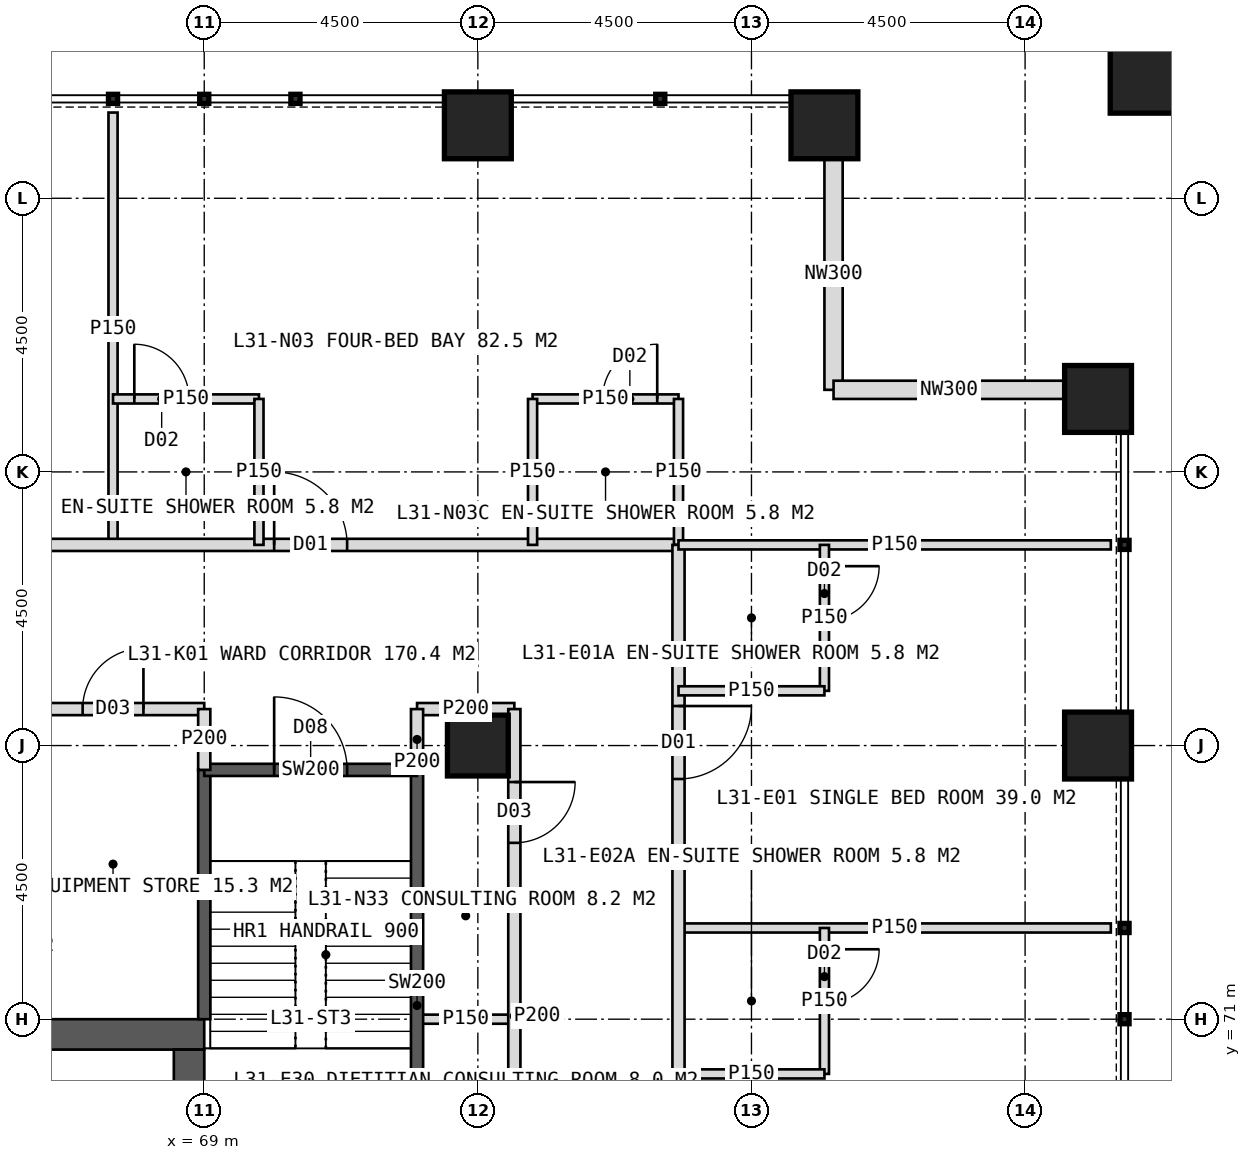
"""IFC4 building model, lengths in metres.
Left out: names, types, materials, properties, quantities, classifications, styles, units other than length and angle.
Written with IfcOpenShell. Run it as: python <this file> out.ifc"""

import sys

from ifc_helpers import new_model, si_unit, direction, frame, frame_2d, origin, origin_2d, place, context, subcontext, project, spatial, rectangle, hollow_rectangle, extrude, element, fill, save


model = new_model("IFC4")
c1 = context("Model", 3, precision=1e-05, world=origin(), true_north=direction((0.0, 1.0)))
c2 = subcontext(c1, "Body", "Model", "MODEL_VIEW")
j1 = project(units=[si_unit("LENGTHUNIT", "METRE"), si_unit("PLANEANGLEUNIT", "RADIAN")], contexts=[c1])
p1 = place(None, origin())
s1 = spatial("IfcSite", under=j1, at=p1, CompositionType="ELEMENT")
p2 = place(p1, origin())
s2 = spatial("IfcBuilding", under=s1, at=p2, CompositionType="ELEMENT")
p3 = place(p2, frame((0.0, 0.0, 132.0)))
s3 = spatial("IfcBuildingStorey", under=s2, at=p3, CompositionType="ELEMENT", Elevation=132.0)
p4 = place(p3, frame((51.0, 70.75, 0.0), z_axis=(0.0, 0.0, 1.0), x_axis=(1.0, 0.0, 0.0)))
e1 = element("IfcWall", 1, at=p4, inside=s3, PredefinedType="SHEAR", context=c2, shape_type="SweptSolid", body=[
    extrude(rectangle(XDim=18.0, YDim=0.5, at=frame_2d((9.0, 0.0))), origin(), (0.0, 0.0, 1.0), 4.0),
])
p5 = place(p4, frame((8.1, 0.0, 0.0)))
e2 = element("IfcOpeningElement", 2, at=p5, cuts=e1, PredefinedType="OPENING", context=c2, shape_type="SweptSolid", body=[
    extrude(rectangle(XDim=1.8, YDim=2.2, at=frame_2d((0.9, 1.1))), frame((0.0, 0.26, 0.0), z_axis=(0.0, -1.0, 0.0), x_axis=(1.0, 0.0, 0.0)), (0.0, 0.0, 1.0), 0.52),
])
p6 = place(p3, frame((68.75, 53.5, 0.0), z_axis=(0.0, 0.0, 1.0), x_axis=(0.0, 1.0, 0.0)))
e3 = element("IfcWall", 3, at=p6, inside=s3, PredefinedType="SHEAR", context=c2, shape_type="SweptSolid", body=[
    extrude(rectangle(XDim=17.0, YDim=0.5, at=frame_2d((8.5, 0.0))), origin(), (0.0, 0.0, 1.0), 4.0),
])
p7 = place(p6, frame((9.5, 0.0, 0.0)))
e4 = element("IfcOpeningElement", 4, at=p7, cuts=e3, PredefinedType="OPENING", context=c2, shape_type="SweptSolid", body=[
    extrude(rectangle(XDim=1.5, YDim=2.2, at=frame_2d((0.75, 1.1))), frame((0.0, 0.26, 0.0), z_axis=(0.0, -1.0, 0.0), x_axis=(1.0, 0.0, 0.0)), (0.0, 0.0, 1.0), 0.52),
])
p8 = place(p3, frame((73.5, 75.5, 0.0), z_axis=(0.0, 0.0, 1.0), x_axis=(1.0, 0.0, 0.0)))
e5 = element("IfcColumn", 5, at=p8, inside=s3, PredefinedType="COLUMN", context=c2, shape_type="SweptSolid", body=[
    extrude(hollow_rectangle(XDim=1.0, YDim=1.0, WallThickness=0.1, at=origin_2d()), origin(), (0.0, 0.0, 1.0), 4.0),
])
for number, where, z_axis, x_axis in (
    (6, (73.5, 85.7, 0.0), (0.0, 0.0, 1.0), (1.0, 0.0, 0.0)),
    (7, (83.7, 75.5, 0.0), (0.0, 0.0, 1.0), (1.0, 0.0, 0.0)),
    (8, (79.2, 85.7, 0.0), (0.0, 0.0, 1.0), (1.0, 0.0, 0.0)),
    (9, (83.7, 81.2, 0.0), (0.0, 0.0, 1.0), (1.0, 0.0, 0.0)),
):
    element("IfcColumn", number, at=place(p3, frame(where, z_axis=z_axis, x_axis=x_axis)), inside=s3, PredefinedType="COLUMN", context=c2, shape_type="SweptSolid", body=[
        extrude(hollow_rectangle(XDim=1.1, YDim=1.1, WallThickness=0.1, at=origin_2d()), origin(), (0.0, 0.0, 1.0), 4.0),
    ])
p9 = place(p3, frame((84.6, 86.6, 0.0), z_axis=(0.0, 0.0, 1.0), x_axis=(1.0, 0.0, 0.0)))
e10 = element("IfcColumn", 10, at=p9, inside=s3, PredefinedType="COLUMN", context=c2, shape_type="SweptSolid", body=[
    extrude(hollow_rectangle(XDim=1.4, YDim=1.4, WallThickness=0.08, at=origin_2d()), origin(), (0.0, 0.0, 1.0), 4.0),
])
for number, where, z_axis, x_axis in (
    (11, (79.35, 85.15, 0.0), (0.0, 0.0, 1.0), (0.0, -1.0, 0.0)),
    (12, (79.35, 81.35, 0.0), (0.0, 0.0, 1.0), (1.0, 0.0, 0.0)),
):
    element("IfcWall", number, at=place(p3, frame(where, z_axis=z_axis, x_axis=x_axis)), inside=s3, PredefinedType="ELEMENTEDWALL", context=c2, shape_type="SweptSolid", body=[
        extrude(rectangle(XDim=3.8, YDim=0.3, at=frame_2d((1.9, 0.0))), origin(), (0.0, 0.0, 1.0), 4.0),
    ])
p10 = place(p3, frame((67.5, 78.8, 0.0), z_axis=(0.0, 0.0, 1.0), x_axis=(0.0, 1.0, 0.0)))
e13 = element("IfcWall", 13, at=p10, inside=s3, PredefinedType="PARTITIONING", context=c2, shape_type="SweptSolid", body=[
    extrude(rectangle(XDim=7.11, YDim=0.15, at=frame_2d((3.555, 0.0))), origin(), (0.0, 0.0, 1.0), 3.75),
])
p11 = place(p3, frame((43.2, 78.8, 0.0), z_axis=(0.0, 0.0, 1.0), x_axis=(1.0, 0.0, 0.0)))
e14 = element("IfcWall", 14, at=p11, inside=s3, PredefinedType="PARTITIONING", context=c2, shape_type="SweptSolid", body=[
    extrude(rectangle(XDim=33.6, YDim=0.2, at=frame_2d((16.8, 0.0))), origin(), (0.0, 0.0, 1.0), 3.75),
])
p12 = place(p11, frame((3.25, 0.0, 0.0)))
e15 = element("IfcOpeningElement", 15, at=p12, cuts=e14, PredefinedType="OPENING", context=c2, shape_type="SweptSolid", body=[
    extrude(rectangle(XDim=1.2, YDim=2.2, at=frame_2d((0.6, 1.1))), frame((0.0, 0.11, 0.0), z_axis=(0.0, -1.0, 0.0), x_axis=(1.0, 0.0, 0.0)), (0.0, 0.0, 1.0), 0.22),
])
p13 = place(p11, frame((12.55, 0.0, 0.0)))
e16 = element("IfcOpeningElement", 16, at=p13, cuts=e14, PredefinedType="OPENING", context=c2, shape_type="SweptSolid", body=[
    extrude(rectangle(XDim=1.2, YDim=2.2, at=frame_2d((0.6, 1.1))), frame((0.0, 0.11, 0.0), z_axis=(0.0, -1.0, 0.0), x_axis=(1.0, 0.0, 0.0)), (0.0, 0.0, 1.0), 0.22),
])
p14 = place(p11, frame((26.95, 0.0, 0.0)))
e17 = element("IfcOpeningElement", 17, at=p14, cuts=e14, PredefinedType="OPENING", context=c2, shape_type="SweptSolid", body=[
    extrude(rectangle(XDim=1.2, YDim=2.2, at=frame_2d((0.6, 1.1))), frame((0.0, 0.11, 0.0), z_axis=(0.0, -1.0, 0.0), x_axis=(1.0, 0.0, 0.0)), (0.0, 0.0, 1.0), 0.22),
])
p15 = place(p3, frame((67.5, 81.2, 0.0), z_axis=(0.0, 0.0, 1.0), x_axis=(1.0, 0.0, 0.0)))
e18 = element("IfcWall", 18, at=p15, inside=s3, PredefinedType="PARTITIONING", context=c2, shape_type="SweptSolid", body=[
    extrude(rectangle(XDim=2.4, YDim=0.15, at=frame_2d((1.2, 0.0))), origin(), (0.0, 0.0, 1.0), 3.75),
])
p16 = place(p15, frame((0.35, 0.0, 0.0)))
e19 = element("IfcOpeningElement", 19, at=p16, cuts=e18, PredefinedType="OPENING", context=c2, shape_type="SweptSolid", body=[
    extrude(rectangle(XDim=0.9, YDim=2.1, at=frame_2d((0.45, 1.05))), frame((0.0, 0.085, 0.0), z_axis=(0.0, -1.0, 0.0), x_axis=(1.0, 0.0, 0.0)), (0.0, 0.0, 1.0), 0.17),
])
p17 = place(p3, frame((69.9, 78.8, 0.0), z_axis=(0.0, 0.0, 1.0), x_axis=(0.0, 1.0, 0.0)))
e20 = element("IfcWall", 20, at=p17, inside=s3, PredefinedType="PARTITIONING", context=c2, shape_type="SweptSolid", body=[
    extrude(rectangle(XDim=2.4, YDim=0.15, at=frame_2d((1.2, 0.0))), origin(), (0.0, 0.0, 1.0), 3.75),
])
p18 = place(p3, frame((74.4, 81.2, 0.0), z_axis=(0.0, 0.0, 1.0), x_axis=(1.0, 0.0, 0.0)))
e21 = element("IfcWall", 21, at=p18, inside=s3, PredefinedType="PARTITIONING", context=c2, shape_type="SweptSolid", body=[
    extrude(rectangle(XDim=2.4, YDim=0.15, at=frame_2d((1.2, 0.0))), origin(), (0.0, 0.0, 1.0), 2.997),
])
p19 = place(p18, frame((1.15, 0.0, 0.0)))
e22 = element("IfcOpeningElement", 22, at=p19, cuts=e21, PredefinedType="OPENING", context=c2, shape_type="SweptSolid", body=[
    extrude(rectangle(XDim=0.9, YDim=2.1, at=frame_2d((0.45, 1.05))), frame((0.0, 0.085, 0.0), z_axis=(0.0, -1.0, 0.0), x_axis=(1.0, 0.0, 0.0)), (0.0, 0.0, 1.0), 0.17),
])
for number, where, z_axis, x_axis in (
    (23, (74.4, 78.8, 0.0), (0.0, 0.0, 1.0), (0.0, 1.0, 0.0)),
    (24, (76.8, 78.8, 0.0), (0.0, 0.0, 1.0), (0.0, 1.0, 0.0)),
):
    element("IfcWall", number, at=place(p3, frame(where, z_axis=z_axis, x_axis=x_axis)), inside=s3, PredefinedType="PARTITIONING", context=c2, shape_type="SweptSolid", body=[
        extrude(rectangle(XDim=2.4, YDim=0.15, at=frame_2d((1.2, 0.0))), origin(), (0.0, 0.0, 1.0), 3.75),
    ])
p20 = place(p3, frame((62.25, 76.1, 0.0), z_axis=(0.0, 0.0, 1.0), x_axis=(1.0, 0.0, 0.0)))
e25 = element("IfcWall", 25, at=p20, inside=s3, PredefinedType="PARTITIONING", context=c2, shape_type="SweptSolid", body=[
    extrude(rectangle(XDim=6.75, YDim=0.2, at=frame_2d((3.375, 0.0))), origin(), (0.0, 0.0, 1.0), 3.75),
])
p21 = place(p20, frame((0.325, 0.0, 0.0)))
e26 = element("IfcOpeningElement", 26, at=p21, cuts=e25, PredefinedType="OPENING", context=c2, shape_type="SweptSolid", body=[
    extrude(rectangle(XDim=1.0, YDim=2.1, at=frame_2d((0.5, 1.05))), frame((0.0, 0.11, 0.0), z_axis=(0.0, -1.0, 0.0), x_axis=(1.0, 0.0, 0.0)), (0.0, 0.0, 1.0), 0.22),
])
p22 = place(p20, frame((4.75, 0.0, 0.0)))
e27 = element("IfcOpeningElement", 27, at=p22, cuts=e25, PredefinedType="OPENING", context=c2, shape_type="SweptSolid", body=[
    extrude(rectangle(XDim=1.0, YDim=2.1, at=frame_2d((0.5, 1.05))), frame((0.0, 0.11, 0.0), z_axis=(0.0, -1.0, 0.0), x_axis=(1.0, 0.0, 0.0)), (0.0, 0.0, 1.0), 0.22),
])
p23 = place(p3, frame((72.5, 76.1, 0.0), z_axis=(0.0, 0.0, 1.0), x_axis=(1.0, 0.0, 0.0)))
e28 = element("IfcWall", 28, at=p23, inside=s3, PredefinedType="PARTITIONING", context=c2, shape_type="SweptSolid", body=[
    extrude(rectangle(XDim=1.6, YDim=0.2, at=frame_2d((0.8, 0.0))), origin(), (0.0, 0.0, 1.0), 3.75),
])
p24 = place(p3, frame((76.8, 72.5, 0.0), z_axis=(0.0, 0.0, 1.0), x_axis=(1.0, 0.0, 0.0)))
e29 = element("IfcWall", 29, at=p24, inside=s3, PredefinedType="PARTITIONING", context=c2, shape_type="SweptSolid", body=[
    extrude(rectangle(XDim=7.11, YDim=0.15, at=frame_2d((3.555, 0.0))), origin(), (0.0, 0.0, 1.0), 3.75),
])
p25 = place(p3, frame((76.8, 78.8, 0.0), z_axis=(0.0, 0.0, 1.0), x_axis=(0.0, -1.0, 0.0)))
e30 = element("IfcWall", 30, at=p25, inside=s3, PredefinedType="PARTITIONING", context=c2, shape_type="SweptSolid", body=[
    extrude(rectangle(XDim=33.6, YDim=0.2, at=frame_2d((16.8, 0.0))), origin(), (0.0, 0.0, 1.0), 3.75),
])
p26 = place(p25, frame((2.65, 0.0, 0.0)))
e31 = element("IfcOpeningElement", 31, at=p26, cuts=e30, PredefinedType="OPENING", context=c2, shape_type="SweptSolid", body=[
    extrude(rectangle(XDim=1.2, YDim=2.2, at=frame_2d((0.6, 1.1))), frame((0.0, 0.11, 0.0), z_axis=(0.0, -1.0, 0.0), x_axis=(1.0, 0.0, 0.0)), (0.0, 0.0, 1.0), 0.22),
])
p27 = place(p25, frame((8.95, 0.0, 0.0)))
e32 = element("IfcOpeningElement", 32, at=p27, cuts=e30, PredefinedType="OPENING", context=c2, shape_type="SweptSolid", body=[
    extrude(rectangle(XDim=1.2, YDim=2.2, at=frame_2d((0.6, 1.1))), frame((0.0, 0.11, 0.0), z_axis=(0.0, -1.0, 0.0), x_axis=(1.0, 0.0, 0.0)), (0.0, 0.0, 1.0), 0.22),
])
p28 = place(p25, frame((19.45, 0.0, 0.0)))
e33 = element("IfcOpeningElement", 33, at=p28, cuts=e30, PredefinedType="OPENING", context=c2, shape_type="SweptSolid", body=[
    extrude(rectangle(XDim=1.2, YDim=2.2, at=frame_2d((0.6, 1.1))), frame((0.0, 0.11, 0.0), z_axis=(0.0, -1.0, 0.0), x_axis=(1.0, 0.0, 0.0)), (0.0, 0.0, 1.0), 0.22),
])
p29 = place(p25, frame((28.45, 0.0, 0.0)))
e34 = element("IfcOpeningElement", 34, at=p29, cuts=e30, PredefinedType="OPENING", context=c2, shape_type="SweptSolid", body=[
    extrude(rectangle(XDim=1.2, YDim=2.2, at=frame_2d((0.6, 1.1))), frame((0.0, 0.11, 0.0), z_axis=(0.0, -1.0, 0.0), x_axis=(1.0, 0.0, 0.0)), (0.0, 0.0, 1.0), 0.22),
])
p30 = place(p3, frame((76.8, 78.8, 0.0), z_axis=(0.0, 0.0, 1.0), x_axis=(1.0, 0.0, 0.0)))
e35 = element("IfcWall", 35, at=p30, inside=s3, PredefinedType="PARTITIONING", context=c2, shape_type="SweptSolid", body=[
    extrude(rectangle(XDim=7.11, YDim=0.15, at=frame_2d((3.555, 0.0))), origin(), (0.0, 0.0, 1.0), 3.75),
])
p31 = place(p3, frame((79.2, 78.8, 0.0), z_axis=(0.0, 0.0, 1.0), x_axis=(0.0, -1.0, 0.0)))
e36 = element("IfcWall", 36, at=p31, inside=s3, PredefinedType="PARTITIONING", context=c2, shape_type="SweptSolid", body=[
    extrude(rectangle(XDim=2.4, YDim=0.15, at=frame_2d((1.2, 0.0))), origin(), (0.0, 0.0, 1.0), 2.997),
])
p32 = place(p31, frame((0.35, 0.0, 0.0)))
e37 = element("IfcOpeningElement", 37, at=p32, cuts=e36, PredefinedType="OPENING", context=c2, shape_type="SweptSolid", body=[
    extrude(rectangle(XDim=0.9, YDim=2.1, at=frame_2d((0.45, 1.05))), frame((0.0, 0.085, 0.0), z_axis=(0.0, -1.0, 0.0), x_axis=(1.0, 0.0, 0.0)), (0.0, 0.0, 1.0), 0.17),
])
p33 = place(p3, frame((76.8, 76.4, 0.0), z_axis=(0.0, 0.0, 1.0), x_axis=(1.0, 0.0, 0.0)))
e38 = element("IfcWall", 38, at=p33, inside=s3, PredefinedType="PARTITIONING", context=c2, shape_type="SweptSolid", body=[
    extrude(rectangle(XDim=2.4, YDim=0.15, at=frame_2d((1.2, 0.0))), origin(), (0.0, 0.0, 1.0), 3.75),
])
p34 = place(p3, frame((79.2, 72.5, 0.0), z_axis=(0.0, 0.0, 1.0), x_axis=(0.0, -1.0, 0.0)))
e39 = element("IfcWall", 39, at=p34, inside=s3, PredefinedType="PARTITIONING", context=c2, shape_type="SweptSolid", body=[
    extrude(rectangle(XDim=2.4, YDim=0.15, at=frame_2d((1.2, 0.0))), origin(), (0.0, 0.0, 1.0), 3.75),
])
p35 = place(p34, frame((0.35, 0.0, 0.0)))
e40 = element("IfcOpeningElement", 40, at=p35, cuts=e39, PredefinedType="OPENING", context=c2, shape_type="SweptSolid", body=[
    extrude(rectangle(XDim=0.9, YDim=2.1, at=frame_2d((0.45, 1.05))), frame((0.0, 0.085, 0.0), z_axis=(0.0, -1.0, 0.0), x_axis=(1.0, 0.0, 0.0)), (0.0, 0.0, 1.0), 0.17),
])
p36 = place(p3, frame((76.8, 70.1, 0.0), z_axis=(0.0, 0.0, 1.0), x_axis=(1.0, 0.0, 0.0)))
e41 = element("IfcWall", 41, at=p36, inside=s3, PredefinedType="PARTITIONING", context=c2, shape_type="SweptSolid", body=[
    extrude(rectangle(XDim=2.4, YDim=0.15, at=frame_2d((1.2, 0.0))), origin(), (0.0, 0.0, 1.0), 3.75),
])
p37 = place(p3, frame((72.5, 71.0, 0.0), z_axis=(0.0, 0.0, 1.0), x_axis=(1.0, 0.0, 0.0)))
e42 = element("IfcWall", 42, at=p37, inside=s3, PredefinedType="PARTITIONING", context=c2, shape_type="SweptSolid", body=[
    extrude(rectangle(XDim=1.6, YDim=0.15, at=frame_2d((0.8, 0.0))), origin(), (0.0, 0.0, 1.0), 3.75),
])
p38 = place(p3, frame((74.1, 76.1, 0.0), z_axis=(0.0, 0.0, 1.0), x_axis=(0.0, -1.0, 0.0)))
e43 = element("IfcWall", 43, at=p38, inside=s3, PredefinedType="PARTITIONING", context=c2, shape_type="SweptSolid", body=[
    extrude(rectangle(XDim=10.1, YDim=0.2, at=frame_2d((5.05, 0.0))), origin(), (0.0, 0.0, 1.0), 3.75),
])
p39 = place(p38, frame((1.2, 0.0, 0.0)))
e44 = element("IfcOpeningElement", 44, at=p39, cuts=e43, PredefinedType="OPENING", context=c2, shape_type="SweptSolid", body=[
    extrude(rectangle(XDim=1.0, YDim=2.1, at=frame_2d((0.5, 1.05))), frame((0.0, 0.11, 0.0), z_axis=(0.0, -1.0, 0.0), x_axis=(1.0, 0.0, 0.0)), (0.0, 0.0, 1.0), 0.22),
])
p40 = place(p38, frame((7.1, 0.0, 0.0)))
e45 = element("IfcOpeningElement", 45, at=p40, cuts=e43, PredefinedType="OPENING", context=c2, shape_type="SweptSolid", body=[
    extrude(rectangle(XDim=1.0, YDim=2.1, at=frame_2d((0.5, 1.05))), frame((0.0, 0.11, 0.0), z_axis=(0.0, -1.0, 0.0), x_axis=(1.0, 0.0, 0.0)), (0.0, 0.0, 1.0), 0.22),
])
p41 = place(p3, frame((69.0, 71.0, 0.0), z_axis=(0.0, 0.0, 1.0), x_axis=(0.0, 1.0, 0.0)))
e46 = element("IfcWall", 46, at=p41, inside=s3, PredefinedType="SOLIDWALL", context=c2, shape_type="SweptSolid", body=[
    extrude(rectangle(XDim=4.1, YDim=0.2, at=frame_2d((2.05, 0.0))), origin(), (0.0, 0.0, 1.0), 3.75),
])
p42 = place(p3, frame((72.5, 67.35, 0.0), z_axis=(0.0, 0.0, 1.0), x_axis=(0.0, 1.0, 0.0)))
e47 = element("IfcWall", 47, at=p42, inside=s3, PredefinedType="SOLIDWALL", context=c2, shape_type="SweptSolid", body=[
    extrude(rectangle(XDim=7.75, YDim=0.2, at=frame_2d((3.875, 0.0))), origin(), (0.0, 0.0, 1.0), 3.75),
])
p43 = place(p3, frame((69.0, 75.1, 0.0), z_axis=(0.0, 0.0, 1.0), x_axis=(1.0, 0.0, 0.0)))
e48 = element("IfcWall", 48, at=p43, inside=s3, PredefinedType="SOLIDWALL", context=c2, shape_type="SweptSolid", body=[
    extrude(rectangle(XDim=3.5, YDim=0.2, at=frame_2d((1.75, 0.0))), origin(), (0.0, 0.0, 1.0), 3.75),
])
p44 = place(p43, frame((1.15, 0.0, 0.0)))
e49 = element("IfcOpeningElement", 49, at=p44, cuts=e48, PredefinedType="OPENING", context=c2, shape_type="SweptSolid", body=[
    extrude(rectangle(XDim=1.2, YDim=2.1, at=frame_2d((0.6, 1.05))), frame((0.0, 0.11, 0.0), z_axis=(0.0, -1.0, 0.0), x_axis=(1.0, 0.0, 0.0)), (0.0, 0.0, 1.0), 0.22),
])
for number, where, z_axis, x_axis in (
    (50, (69.0, 75.1, 0.0), (0.0, 0.0, 1.0), (0.0, 1.0, 0.0)),
    (51, (72.5, 75.1, 0.0), (0.0, 0.0, 1.0), (0.0, 1.0, 0.0)),
):
    element("IfcWall", number, at=place(p3, frame(where, z_axis=z_axis, x_axis=x_axis)), inside=s3, PredefinedType="PARTITIONING", context=c2, shape_type="SweptSolid", body=[
        extrude(rectangle(XDim=1.0, YDim=0.2, at=frame_2d((0.5, 0.0))), origin(), (0.0, 0.0, 1.0), 3.75),
    ])
p45 = place(p14, origin())
e52 = element("IfcDoor", 52, at=p45, inside=s3, OperationType="SINGLE_SWING_LEFT", PredefinedType="DOOR", context=c2, shape_type="SweptSolid", body=[
    extrude(rectangle(XDim=1.2, YDim=2.2, at=frame_2d((0.6, 1.1))), frame((0.0, 0.025, 0.0), z_axis=(0.0, -1.0, 0.0), x_axis=(1.0, 0.0, 0.0)), (0.0, 0.0, 1.0), 0.05),
])
fill(e17, e52)
p46 = place(p16, origin())
e53 = element("IfcDoor", 53, at=p46, inside=s3, OperationType="SINGLE_SWING_LEFT", PredefinedType="DOOR", context=c2, shape_type="SweptSolid", body=[
    extrude(rectangle(XDim=0.9, YDim=2.1, at=frame_2d((0.45, 1.05))), frame((0.0, 0.025, 0.0), z_axis=(0.0, -1.0, 0.0), x_axis=(1.0, 0.0, 0.0)), (0.0, 0.0, 1.0), 0.05),
])
fill(e19, e53)
p47 = place(p19, origin())
e54 = element("IfcDoor", 54, at=p47, inside=s3, OperationType="SINGLE_SWING_RIGHT", PredefinedType="DOOR", context=c2, shape_type="SweptSolid", body=[
    extrude(rectangle(XDim=0.9, YDim=2.1, at=frame_2d((0.45, 1.05))), frame((0.0, 0.025, 0.0), z_axis=(0.0, -1.0, 0.0), x_axis=(1.0, 0.0, 0.0)), (0.0, 0.0, 1.0), 0.05),
])
fill(e22, e54)
p48 = place(p22, origin())
e55 = element("IfcDoor", 55, at=p48, inside=s3, OperationType="SINGLE_SWING_RIGHT", PredefinedType="DOOR", context=c2, shape_type="SweptSolid", body=[
    extrude(rectangle(XDim=1.0, YDim=2.1, at=frame_2d((0.5, 1.05))), frame((0.0, 0.025, 0.0), z_axis=(0.0, -1.0, 0.0), x_axis=(1.0, 0.0, 0.0)), (0.0, 0.0, 1.0), 0.05),
])
fill(e27, e55)
p49 = place(p39, origin())
e56 = element("IfcDoor", 56, at=p49, inside=s3, OperationType="SINGLE_SWING_LEFT", PredefinedType="DOOR", context=c2, shape_type="SweptSolid", body=[
    extrude(rectangle(XDim=1.0, YDim=2.1, at=frame_2d((0.5, 1.05))), frame((0.0, 0.025, 0.0), z_axis=(0.0, -1.0, 0.0), x_axis=(1.0, 0.0, 0.0)), (0.0, 0.0, 1.0), 0.05),
])
fill(e44, e56)
p50 = place(p26, origin())
e57 = element("IfcDoor", 57, at=p50, inside=s3, OperationType="SINGLE_SWING_LEFT", PredefinedType="DOOR", context=c2, shape_type="SweptSolid", body=[
    extrude(rectangle(XDim=1.2, YDim=2.2, at=frame_2d((0.6, 1.1))), frame((0.0, 0.025, 0.0), z_axis=(0.0, -1.0, 0.0), x_axis=(1.0, 0.0, 0.0)), (0.0, 0.0, 1.0), 0.05),
])
fill(e31, e57)
p51 = place(p32, origin())
e58 = element("IfcDoor", 58, at=p51, inside=s3, OperationType="SINGLE_SWING_LEFT", PredefinedType="DOOR", context=c2, shape_type="SweptSolid", body=[
    extrude(rectangle(XDim=0.9, YDim=2.1, at=frame_2d((0.45, 1.05))), frame((0.0, 0.025, 0.0), z_axis=(0.0, -1.0, 0.0), x_axis=(1.0, 0.0, 0.0)), (0.0, 0.0, 1.0), 0.05),
])
fill(e37, e58)
p52 = place(p35, origin())
e59 = element("IfcDoor", 59, at=p52, inside=s3, OperationType="SINGLE_SWING_LEFT", PredefinedType="DOOR", context=c2, shape_type="SweptSolid", body=[
    extrude(rectangle(XDim=0.9, YDim=2.1, at=frame_2d((0.45, 1.05))), frame((0.0, 0.025, 0.0), z_axis=(0.0, -1.0, 0.0), x_axis=(1.0, 0.0, 0.0)), (0.0, 0.0, 1.0), 0.05),
])
fill(e40, e59)
p53 = place(p44, origin())
e60 = element("IfcDoor", 60, at=p53, inside=s3, OperationType="SINGLE_SWING_LEFT", PredefinedType="DOOR", context=c2, shape_type="SweptSolid", body=[
    extrude(rectangle(XDim=1.2, YDim=2.1, at=frame_2d((0.6, 1.05))), frame((0.0, 0.025, 0.0), z_axis=(0.0, -1.0, 0.0), x_axis=(1.0, 0.0, 0.0)), (0.0, 0.0, 1.0), 0.05),
])
fill(e49, e60)
save(model, sys.argv[1])
